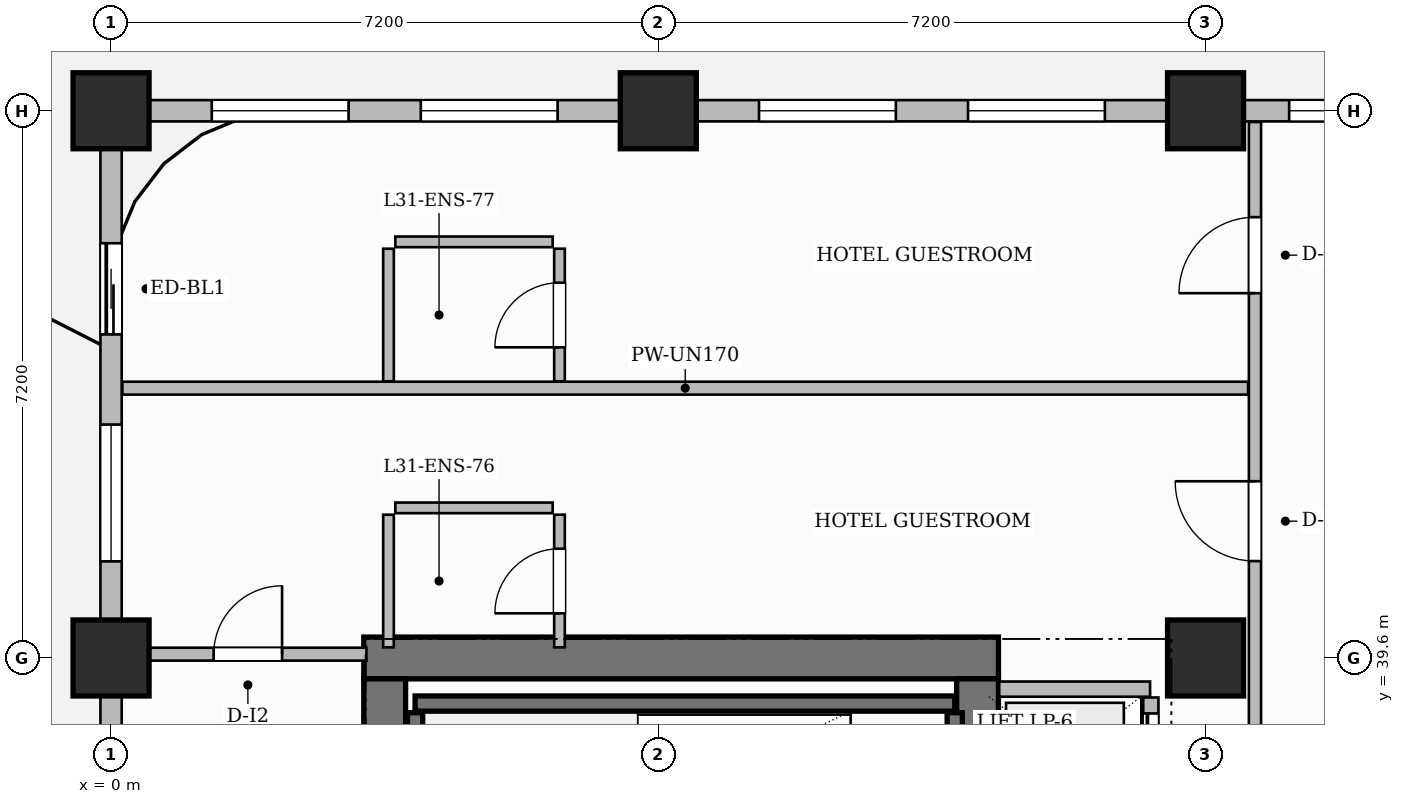
"""IFC4 building model, lengths in metres.
Left out: names, types, materials, properties, quantities, classifications, styles, units other than length and angle.
Written with IfcOpenShell. Run it as: python <this file> out.ifc"""

import sys

from ifc_helpers import new_model, si_unit, direction, frame, frame_2d, origin, origin_2d, place, context, subcontext, project, spatial, rectangle, extrude, source, transform, mapped, element, fill, save


model = new_model("IFC4")
c1 = context("Model", 3, precision=1e-05, world=origin(), true_north=direction((0.0, 1.0)))
c2 = subcontext(c1, "Body", "Model", "MODEL_VIEW")
j1 = project(units=[si_unit("LENGTHUNIT", "METRE"), si_unit("PLANEANGLEUNIT", "RADIAN")], contexts=[c1])
p1 = place(None, origin())
s1 = spatial("IfcSite", under=j1, at=p1, CompositionType="ELEMENT")
p2 = place(p1, origin())
s2 = spatial("IfcBuilding", under=s1, at=p2, CompositionType="ELEMENT")
p3 = place(p2, frame((0.0, 0.0, 126.6)))
s3 = spatial("IfcBuildingStorey", under=s2, at=p3, CompositionType="ELEMENT", Elevation=126.6)
p4 = place(p3, frame((3.325, 39.6, 0.0), z_axis=(0.0, 0.0, 1.0), x_axis=(1.0, 0.0, 0.0)))
e1 = element("IfcWall", 1, at=p4, inside=s3, PredefinedType="SHEAR", context=c2, shape_type="SweptSolid", body=[
    extrude(rectangle(XDim=8.35, YDim=0.55, at=frame_2d((4.175, 0.0))), origin(), (0.0, 0.0, 1.0), 3.7),
])
p5 = place(p3, frame((3.6, 25.475, 0.0), z_axis=(0.0, 0.0, 1.0), x_axis=(0.0, 1.0, 0.0)))
e2 = element("IfcWall", 2, at=p5, inside=s3, PredefinedType="SHEAR", context=c2, shape_type="SweptSolid", body=[
    extrude(rectangle(XDim=13.85, YDim=0.55, at=frame_2d((6.925, 0.0))), origin(), (0.0, 0.0, 1.0), 3.7),
])
p6 = place(p3, frame((11.4, 25.475, 0.0), z_axis=(0.0, 0.0, 1.0), x_axis=(0.0, 1.0, 0.0)))
e3 = element("IfcWall", 3, at=p6, inside=s3, PredefinedType="SHEAR", context=c2, shape_type="SweptSolid", body=[
    extrude(rectangle(XDim=13.85, YDim=0.55, at=frame_2d((6.925, 0.0))), origin(), (0.0, 0.0, 1.0), 3.7),
])
p7 = place(p6, frame((6.495, 0.0, 0.0)))
e4 = element("IfcOpeningElement", 4, at=p7, cuts=e3, PredefinedType="OPENING", context=c2, shape_type="SweptSolid", body=[
    extrude(rectangle(XDim=1.5, YDim=2.2, at=frame_2d((0.75, 1.1))), frame((0.0, 0.285, 0.0), z_axis=(0.0, -1.0, 0.0), x_axis=(1.0, 0.0, 0.0)), (0.0, 0.0, 1.0), 0.57),
])
m1 = source(origin(), c2, "Body", "SweptSolid", [
    extrude(rectangle(XDim=1.0, YDim=1.0, at=origin_2d()), origin(), (0.0, 0.0, 1.0), 3.7),
])
for number, where, z_axis, x_axis in (
    (5, (0.0, 39.6, 0.0), (0.0, 0.0, 1.0), (1.0, 0.0, 0.0)),
    (6, (0.0, 46.8, 0.0), (0.0, 0.0, 1.0), (1.0, 0.0, 0.0)),
    (7, (7.2, 46.8, 0.0), (0.0, 0.0, 1.0), (1.0, 0.0, 0.0)),
    (8, (14.4, 39.6, 0.0), (0.0, 0.0, 1.0), (1.0, 0.0, 0.0)),
    (9, (14.4, 46.8, 0.0), (0.0, 0.0, 1.0), (1.0, 0.0, 0.0)),
):
    element("IfcColumn", number, at=place(p3, frame(where, z_axis=z_axis, x_axis=x_axis)), inside=s3, PredefinedType="COLUMN", context=c2, shape_type="MappedRepresentation", body=[
        mapped(m1, transform((0.0, 0.0, 0.0), scale=1.0)),
    ])
p8 = place(p3, frame((4.0, 39.0, 0.0), z_axis=(0.0, 0.0, 1.0), x_axis=(1.0, 0.0, 0.0)))
e10 = element("IfcWall", 10, at=p8, inside=s3, PredefinedType="SHEAR", context=c2, shape_type="SweptSolid", body=[
    extrude(rectangle(XDim=7.1, YDim=0.2, at=frame_2d((3.55, 0.0))), origin(), (0.0, 0.0, 1.0), 3.7),
])
for number, where, z_axis, x_axis in (
    (11, (4.0, 36.18, 0.0), (0.0, 0.0, 1.0), (0.0, 1.0, 0.0)),
    (12, (11.1, 36.18, 0.0), (0.0, 0.0, 1.0), (0.0, 1.0, 0.0)),
):
    element("IfcWall", number, at=place(p3, frame(where, z_axis=z_axis, x_axis=x_axis)), inside=s3, PredefinedType="SHEAR", context=c2, shape_type="SweptSolid", body=[
        extrude(rectangle(XDim=2.7, YDim=0.2, at=frame_2d((1.35, 0.0))), origin(), (0.0, 0.0, 1.0), 3.7),
    ])
p9 = place(p3, frame((11.685, 39.19, 0.0), z_axis=(0.0, 0.0, 1.0), x_axis=(1.0, 0.0, 0.0)))
e13 = element("IfcWall", 13, at=p9, inside=s3, PredefinedType="PARTITIONING", context=c2, shape_type="SweptSolid", body=[
    extrude(rectangle(XDim=1.985, YDim=0.2, at=frame_2d((0.992, 0.0))), origin(), (0.0, 0.0, 1.0), 3.45),
])
p10 = place(p3, frame((13.68, 34.36, 0.0), z_axis=(0.0, 0.0, 1.0), x_axis=(0.0, 1.0, 0.0)))
e14 = element("IfcWall", 14, at=p10, inside=s3, PredefinedType="PARTITIONING", context=c2, shape_type="SweptSolid", body=[
    extrude(rectangle(XDim=4.72, YDim=0.2, at=frame_2d((2.36, 0.0))), origin(), (0.0, 0.0, 1.0), 3.45),
])
p11 = place(p10, frame((0.21, 0.0, 0.0)))
e15 = element("IfcOpeningElement", 15, at=p11, cuts=e14, PredefinedType="OPENING", context=c2, shape_type="SweptSolid", body=[
    extrude(rectangle(XDim=1.1, YDim=2.2, at=frame_2d((0.55, 1.1))), frame((0.0, 0.11, 0.0), z_axis=(0.0, -1.0, 0.0), x_axis=(1.0, 0.0, 0.0)), (0.0, 0.0, 1.0), 0.22),
])
p12 = place(p10, frame((1.81, 0.0, 0.0)))
e16 = element("IfcOpeningElement", 16, at=p12, cuts=e14, PredefinedType="OPENING", context=c2, shape_type="SweptSolid", body=[
    extrude(rectangle(XDim=1.1, YDim=2.2, at=frame_2d((0.55, 1.1))), frame((0.0, 0.11, 0.0), z_axis=(0.0, -1.0, 0.0), x_axis=(1.0, 0.0, 0.0)), (0.0, 0.0, 1.0), 0.22),
])
p13 = place(p10, frame((3.41, 0.0, 0.0)))
e17 = element("IfcOpeningElement", 17, at=p13, cuts=e14, PredefinedType="OPENING", context=c2, shape_type="SweptSolid", body=[
    extrude(rectangle(XDim=1.1, YDim=2.2, at=frame_2d((0.55, 1.1))), frame((0.0, 0.11, 0.0), z_axis=(0.0, -1.0, 0.0), x_axis=(1.0, 0.0, 0.0)), (0.0, 0.0, 1.0), 0.22),
])
p14 = place(p3, frame((0.24, 39.65, 0.0), z_axis=(0.0, 0.0, 1.0), x_axis=(1.0, 0.0, 0.0)))
e18 = element("IfcWall", 18, at=p14, inside=s3, PredefinedType="PARTITIONING", context=c2, shape_type="SweptSolid", body=[
    extrude(rectangle(XDim=3.12, YDim=0.17, at=frame_2d((1.56, 0.0))), origin(), (0.0, 0.0, 1.0), 3.45),
])
p15 = place(p14, frame((1.11, 0.0, 0.0)))
e19 = element("IfcOpeningElement", 19, at=p15, cuts=e18, PredefinedType="OPENING", context=c2, shape_type="SweptSolid", body=[
    extrude(rectangle(XDim=0.9, YDim=2.15, at=frame_2d((0.45, 1.075))), frame((0.0, 0.095, 0.0), z_axis=(0.0, -1.0, 0.0), x_axis=(1.0, 0.0, 0.0)), (0.0, 0.0, 1.0), 0.19),
])
p16 = place(p3, frame((15.05, 34.34, 0.0), z_axis=(0.0, 0.0, 1.0), x_axis=(0.0, 1.0, 0.0)))
e20 = element("IfcWall", 20, at=p16, inside=s3, PredefinedType="PARTITIONING", context=c2, shape_type="SweptSolid", body=[
    extrude(rectangle(XDim=12.312, YDim=0.16, at=frame_2d((6.156, 0.0))), origin(), (0.0, 0.0, 1.0), 3.45),
])
p17 = place(p16, frame((6.535, 0.0, 0.0)))
e21 = element("IfcOpeningElement", 21, at=p17, cuts=e20, PredefinedType="OPENING", context=c2, shape_type="SweptSolid", body=[
    extrude(rectangle(XDim=1.05, YDim=2.25, at=frame_2d((0.525, 1.125))), frame((0.0, 0.09, 0.0), z_axis=(0.0, -1.0, 0.0), x_axis=(1.0, 0.0, 0.0)), (0.0, 0.0, 1.0), 0.18),
])
p18 = place(p16, frame((10.06, 0.0, 0.0)))
e22 = element("IfcOpeningElement", 22, at=p18, cuts=e20, PredefinedType="OPENING", context=c2, shape_type="SweptSolid", body=[
    extrude(rectangle(XDim=1.0, YDim=2.2, at=frame_2d((0.5, 1.1))), frame((0.0, 0.09, 0.0), z_axis=(0.0, -1.0, 0.0), x_axis=(1.0, 0.0, 0.0)), (0.0, 0.0, 1.0), 0.18),
])
p19 = place(p3, frame((0.148, 43.15, 0.0), z_axis=(0.0, 0.0, 1.0), x_axis=(1.0, 0.0, 0.0)))
e23 = element("IfcWall", 23, at=p19, inside=s3, PredefinedType="PARTITIONING", context=c2, shape_type="SweptSolid", body=[
    extrude(rectangle(XDim=14.812, YDim=0.17, at=frame_2d((7.406, 0.0))), origin(), (0.0, 0.0, 1.0), 3.45),
])
p20 = place(p3, frame((3.65, 39.74, 0.0), z_axis=(0.0, 0.0, 1.0), x_axis=(0.0, 1.0, 0.0)))
e24 = element("IfcWall", 24, at=p20, inside=s3, PredefinedType="PARTITIONING", context=c2, shape_type="SweptSolid", body=[
    extrude(rectangle(XDim=1.745, YDim=0.14, at=frame_2d((0.873, 0.0))), origin(), (0.0, 0.0, 1.0), 3.45),
])
p21 = place(p3, frame((3.74, 41.575, 0.0), z_axis=(0.0, 0.0, 1.0), x_axis=(1.0, 0.0, 0.0)))
e25 = element("IfcWall", 25, at=p21, inside=s3, PredefinedType="PARTITIONING", context=c2, shape_type="SweptSolid", body=[
    extrude(rectangle(XDim=2.07, YDim=0.14, at=frame_2d((1.035, 0.0))), origin(), (0.0, 0.0, 1.0), 2.935),
])
p22 = place(p3, frame((5.9, 39.74, 0.0), z_axis=(0.0, 0.0, 1.0), x_axis=(0.0, 1.0, 0.0)))
e26 = element("IfcWall", 26, at=p22, inside=s3, PredefinedType="PARTITIONING", context=c2, shape_type="SweptSolid", body=[
    extrude(rectangle(XDim=1.745, YDim=0.14, at=frame_2d((0.873, 0.0))), origin(), (0.0, 0.0, 1.0), 3.45),
])
p23 = place(p22, frame((0.448, 0.0, 0.0)))
e27 = element("IfcOpeningElement", 27, at=p23, cuts=e26, PredefinedType="OPENING", context=c2, shape_type="SweptSolid", body=[
    extrude(rectangle(XDim=0.85, YDim=2.1, at=frame_2d((0.425, 1.05))), frame((0.0, 0.08, 0.0), z_axis=(0.0, -1.0, 0.0), x_axis=(1.0, 0.0, 0.0)), (0.0, 0.0, 1.0), 0.16),
])
p24 = place(p3, frame((3.65, 43.24, 0.0), z_axis=(0.0, 0.0, 1.0), x_axis=(0.0, 1.0, 0.0)))
e28 = element("IfcWall", 28, at=p24, inside=s3, PredefinedType="PARTITIONING", context=c2, shape_type="SweptSolid", body=[
    extrude(rectangle(XDim=1.745, YDim=0.14, at=frame_2d((0.873, 0.0))), origin(), (0.0, 0.0, 1.0), 3.45),
])
p25 = place(p3, frame((3.74, 45.075, 0.0), z_axis=(0.0, 0.0, 1.0), x_axis=(1.0, 0.0, 0.0)))
e29 = element("IfcWall", 29, at=p25, inside=s3, PredefinedType="PARTITIONING", context=c2, shape_type="SweptSolid", body=[
    extrude(rectangle(XDim=2.07, YDim=0.14, at=frame_2d((1.035, 0.0))), origin(), (0.0, 0.0, 1.0), 3.45),
])
p26 = place(p3, frame((5.9, 43.24, 0.0), z_axis=(0.0, 0.0, 1.0), x_axis=(0.0, 1.0, 0.0)))
e30 = element("IfcWall", 30, at=p26, inside=s3, PredefinedType="PARTITIONING", context=c2, shape_type="SweptSolid", body=[
    extrude(rectangle(XDim=1.745, YDim=0.14, at=frame_2d((0.873, 0.0))), origin(), (0.0, 0.0, 1.0), 3.45),
])
p27 = place(p26, frame((0.448, 0.0, 0.0)))
e31 = element("IfcOpeningElement", 31, at=p27, cuts=e30, PredefinedType="OPENING", context=c2, shape_type="SweptSolid", body=[
    extrude(rectangle(XDim=0.85, YDim=2.1, at=frame_2d((0.425, 1.05))), frame((0.0, 0.08, 0.0), z_axis=(0.0, -1.0, 0.0), x_axis=(1.0, 0.0, 0.0)), (0.0, 0.0, 1.0), 0.16),
])
p28 = place(p3, frame((0.0, 25.25, 0.0), z_axis=(0.0, 0.0, 1.0), x_axis=(0.0, 1.0, 0.0)))
e32 = element("IfcWall", 32, at=p28, inside=s3, PredefinedType="SOLIDWALL", context=c2, shape_type="SweptSolid", body=[
    extrude(rectangle(XDim=21.5, YDim=0.28, at=frame_2d((10.75, 0.0))), origin(), (0.0, 0.0, 1.0), 2.935),
])
p29 = place(p28, frame((18.607, 0.0, 0.0)))
e33 = element("IfcOpeningElement", 33, at=p29, cuts=e32, PredefinedType="OPENING", context=c2, shape_type="SweptSolid", body=[
    extrude(rectangle(XDim=1.2, YDim=2.2, at=frame_2d((0.6, 1.1))), frame((0.0, 0.15, 0.0), z_axis=(0.0, -1.0, 0.0), x_axis=(1.0, 0.0, 0.0)), (0.0, 0.0, 1.0), 0.3),
])
p30 = place(p28, frame((0.8, 0.0, 0.0)))
e34 = element("IfcOpeningElement", 34, at=p30, cuts=e32, PredefinedType="OPENING", context=c2, shape_type="SweptSolid", body=[
    extrude(rectangle(XDim=1.2, YDim=2.2, at=frame_2d((0.6, 1.1))), frame((0.0, 0.15, 0.0), z_axis=(0.0, -1.0, 0.0), x_axis=(1.0, 0.0, 0.0)), (0.0, 0.0, 1.0), 0.3),
])
p31 = place(p28, frame((3.425, 0.0, 0.8)))
e35 = element("IfcOpeningElement", 35, at=p31, cuts=e32, PredefinedType="OPENING", context=c2, shape_type="SweptSolid", body=[
    extrude(rectangle(XDim=1.8, YDim=1.85, at=frame_2d((0.9, 0.925))), frame((0.0, 0.15, 0.0), z_axis=(0.0, -1.0, 0.0), x_axis=(1.0, 0.0, 0.0)), (0.0, 0.0, 1.0), 0.3),
])
p32 = place(p28, frame((8.475, 0.0, 0.8)))
e36 = element("IfcOpeningElement", 36, at=p32, cuts=e32, PredefinedType="OPENING", context=c2, shape_type="SweptSolid", body=[
    extrude(rectangle(XDim=1.8, YDim=1.85, at=frame_2d((0.9, 0.925))), frame((0.0, 0.15, 0.0), z_axis=(0.0, -1.0, 0.0), x_axis=(1.0, 0.0, 0.0)), (0.0, 0.0, 1.0), 0.3),
])
p33 = place(p28, frame((11.225, 0.0, 0.8)))
e37 = element("IfcOpeningElement", 37, at=p33, cuts=e32, PredefinedType="OPENING", context=c2, shape_type="SweptSolid", body=[
    extrude(rectangle(XDim=1.8, YDim=1.85, at=frame_2d((0.9, 0.925))), frame((0.0, 0.15, 0.0), z_axis=(0.0, -1.0, 0.0), x_axis=(1.0, 0.0, 0.0)), (0.0, 0.0, 1.0), 0.3),
])
p34 = place(p28, frame((15.621, 0.0, 0.8)))
e38 = element("IfcOpeningElement", 38, at=p34, cuts=e32, PredefinedType="OPENING", context=c2, shape_type="SweptSolid", body=[
    extrude(rectangle(XDim=1.8, YDim=1.85, at=frame_2d((0.9, 0.925))), frame((0.0, 0.15, 0.0), z_axis=(0.0, -1.0, 0.0), x_axis=(1.0, 0.0, 0.0)), (0.0, 0.0, 1.0), 0.3),
])
p35 = place(p3, frame((0.0, 46.8, 0.0), z_axis=(0.0, 0.0, 1.0), x_axis=(1.0, 0.0, 0.0)))
e39 = element("IfcWall", 39, at=p35, inside=s3, PredefinedType="SOLIDWALL", context=c2, shape_type="SweptSolid", body=[
    extrude(rectangle(XDim=18.0, YDim=0.28, at=frame_2d((9.0, 0.0))), origin(), (0.0, 0.0, 1.0), 2.935),
])
p36 = place(p35, frame((1.325, 0.0, 0.8)))
e40 = element("IfcOpeningElement", 40, at=p36, cuts=e39, PredefinedType="OPENING", context=c2, shape_type="SweptSolid", body=[
    extrude(rectangle(XDim=1.8, YDim=1.85, at=frame_2d((0.9, 0.925))), frame((0.0, 0.15, 0.0), z_axis=(0.0, -1.0, 0.0), x_axis=(1.0, 0.0, 0.0)), (0.0, 0.0, 1.0), 0.3),
])
p37 = place(p35, frame((4.075, 0.0, 0.8)))
e41 = element("IfcOpeningElement", 41, at=p37, cuts=e39, PredefinedType="OPENING", context=c2, shape_type="SweptSolid", body=[
    extrude(rectangle(XDim=1.8, YDim=1.85, at=frame_2d((0.9, 0.925))), frame((0.0, 0.15, 0.0), z_axis=(0.0, -1.0, 0.0), x_axis=(1.0, 0.0, 0.0)), (0.0, 0.0, 1.0), 0.3),
])
p38 = place(p35, frame((8.525, 0.0, 0.8)))
e42 = element("IfcOpeningElement", 42, at=p38, cuts=e39, PredefinedType="OPENING", context=c2, shape_type="SweptSolid", body=[
    extrude(rectangle(XDim=1.8, YDim=1.85, at=frame_2d((0.9, 0.925))), frame((0.0, 0.15, 0.0), z_axis=(0.0, -1.0, 0.0), x_axis=(1.0, 0.0, 0.0)), (0.0, 0.0, 1.0), 0.3),
])
p39 = place(p35, frame((11.275, 0.0, 0.8)))
e43 = element("IfcOpeningElement", 43, at=p39, cuts=e39, PredefinedType="OPENING", context=c2, shape_type="SweptSolid", body=[
    extrude(rectangle(XDim=1.8, YDim=1.85, at=frame_2d((0.9, 0.925))), frame((0.0, 0.15, 0.0), z_axis=(0.0, -1.0, 0.0), x_axis=(1.0, 0.0, 0.0)), (0.0, 0.0, 1.0), 0.3),
])
p40 = place(p35, frame((15.5, 0.0, 0.8)))
e44 = element("IfcOpeningElement", 44, at=p40, cuts=e39, PredefinedType="OPENING", context=c2, shape_type="SweptSolid", body=[
    extrude(rectangle(XDim=1.4, YDim=1.85, at=frame_2d((0.7, 0.925))), frame((0.0, 0.15, 0.0), z_axis=(0.0, -1.0, 0.0), x_axis=(1.0, 0.0, 0.0)), (0.0, 0.0, 1.0), 0.3),
])
m2 = source(origin(), c2, "Body", "SweptSolid", [
    extrude(rectangle(XDim=0.9, YDim=2.15, at=frame_2d((0.45, 1.075))), frame((0.0, 0.025, 0.0), z_axis=(0.0, -1.0, 0.0), x_axis=(1.0, 0.0, 0.0)), (0.0, 0.0, 1.0), 0.05),
])
p41 = place(p15, origin())
e45 = element("IfcDoor", 45, at=p41, inside=s3, OperationType="SINGLE_SWING_RIGHT", PredefinedType="DOOR", context=c2, shape_type="MappedRepresentation", body=[
    mapped(m2, transform((0.0, 0.0, 0.0), scale=1.0)),
])
fill(e19, e45)
m3 = source(origin(), c2, "Body", "SweptSolid", [
    extrude(rectangle(XDim=0.85, YDim=2.1, at=frame_2d((0.425, 1.05))), frame((0.0, 0.025, 0.0), z_axis=(0.0, -1.0, 0.0), x_axis=(1.0, 0.0, 0.0)), (0.0, 0.0, 1.0), 0.05),
])
p42 = place(p23, origin())
e46 = element("IfcDoor", 46, at=p42, inside=s3, OperationType="SINGLE_SWING_LEFT", PredefinedType="DOOR", context=c2, shape_type="MappedRepresentation", body=[
    mapped(m3, transform((0.0, 0.0, 0.0), scale=1.0)),
])
fill(e27, e46)
m4 = source(origin(), c2, "Body", "SweptSolid", [
    extrude(rectangle(XDim=1.05, YDim=2.25, at=frame_2d((0.525, 1.125))), frame((0.0, 0.025, 0.0), z_axis=(0.0, -1.0, 0.0), x_axis=(1.0, 0.0, 0.0)), (0.0, 0.0, 1.0), 0.05),
])
p43 = place(p17, origin())
e47 = element("IfcDoor", 47, at=p43, inside=s3, OperationType="SINGLE_SWING_RIGHT", PredefinedType="DOOR", context=c2, shape_type="MappedRepresentation", body=[
    mapped(m4, transform((0.0, 0.0, 0.0), scale=1.0)),
])
fill(e21, e47)
p44 = place(p27, origin())
e48 = element("IfcDoor", 48, at=p44, inside=s3, OperationType="SINGLE_SWING_LEFT", PredefinedType="DOOR", context=c2, shape_type="MappedRepresentation", body=[
    mapped(m3, transform((0.0, 0.0, 0.0), scale=1.0)),
])
fill(e31, e48)
m5 = source(origin(), c2, "Body", "SweptSolid", [
    extrude(rectangle(XDim=1.0, YDim=2.2, at=frame_2d((0.5, 1.1))), frame((0.0, 0.025, 0.0), z_axis=(0.0, -1.0, 0.0), x_axis=(1.0, 0.0, 0.0)), (0.0, 0.0, 1.0), 0.05),
])
p45 = place(p18, origin())
e49 = element("IfcDoor", 49, at=p45, inside=s3, OperationType="SINGLE_SWING_LEFT", PredefinedType="DOOR", context=c2, shape_type="MappedRepresentation", body=[
    mapped(m5, transform((0.0, 0.0, 0.0), scale=1.0)),
])
fill(e22, e49)
m6 = source(origin(), c2, "Body", "SweptSolid", [
    extrude(rectangle(XDim=1.1, YDim=2.2, at=frame_2d((0.55, 1.1))), frame((0.0, 0.025, 0.0), z_axis=(0.0, -1.0, 0.0), x_axis=(1.0, 0.0, 0.0)), (0.0, 0.0, 1.0), 0.05),
])
p46 = place(p13, origin())
e50 = element("IfcDoor", 50, at=p46, inside=s3, OperationType="SLIDING_TO_LEFT", PredefinedType="DOOR", context=c2, shape_type="MappedRepresentation", body=[
    mapped(m6, transform((0.0, 0.0, 0.0), scale=1.0)),
])
fill(e17, e50)
m7 = source(origin(), c2, "Body", "SweptSolid", [
    extrude(rectangle(XDim=1.2, YDim=2.2, at=frame_2d((0.6, 1.1))), frame((0.0, 0.025, 0.0), z_axis=(0.0, -1.0, 0.0), x_axis=(1.0, 0.0, 0.0)), (0.0, 0.0, 1.0), 0.05),
])
p47 = place(p29, origin())
e51 = element("IfcDoor", 51, at=p47, inside=s3, OperationType="SLIDING_TO_LEFT", PredefinedType="DOOR", context=c2, shape_type="MappedRepresentation", body=[
    mapped(m7, transform((0.0, 0.0, 0.0), scale=1.0)),
])
fill(e33, e51)
m8 = source(origin(), c2, "Body", "SweptSolid", [
    extrude(rectangle(XDim=1.8, YDim=1.85, at=frame_2d((0.9, 0.925))), frame((0.0, 0.03, 0.0), z_axis=(0.0, -1.0, 0.0), x_axis=(1.0, 0.0, 0.0)), (0.0, 0.0, 1.0), 0.06),
])
p48 = place(p34, origin())
e52 = element("IfcWindow", 52, at=p48, inside=s3, PartitioningType="DOUBLE_PANEL_VERTICAL", PredefinedType="WINDOW", context=c2, shape_type="MappedRepresentation", body=[
    mapped(m8, transform((0.0, 0.0, 0.0), scale=1.0)),
])
fill(e38, e52)
p49 = place(p36, origin())
e53 = element("IfcWindow", 53, at=p49, inside=s3, PartitioningType="DOUBLE_PANEL_VERTICAL", PredefinedType="WINDOW", context=c2, shape_type="MappedRepresentation", body=[
    mapped(m8, transform((0.0, 0.0, 0.0), scale=1.0)),
])
fill(e40, e53)
p50 = place(p37, origin())
e54 = element("IfcWindow", 54, at=p50, inside=s3, PartitioningType="DOUBLE_PANEL_VERTICAL", PredefinedType="WINDOW", context=c2, shape_type="MappedRepresentation", body=[
    mapped(m8, transform((0.0, 0.0, 0.0), scale=1.0)),
])
fill(e41, e54)
p51 = place(p38, origin())
e55 = element("IfcWindow", 55, at=p51, inside=s3, PartitioningType="DOUBLE_PANEL_VERTICAL", PredefinedType="WINDOW", context=c2, shape_type="MappedRepresentation", body=[
    mapped(m8, transform((0.0, 0.0, 0.0), scale=1.0)),
])
fill(e42, e55)
p52 = place(p39, origin())
e56 = element("IfcWindow", 56, at=p52, inside=s3, PartitioningType="DOUBLE_PANEL_VERTICAL", PredefinedType="WINDOW", context=c2, shape_type="MappedRepresentation", body=[
    mapped(m8, transform((0.0, 0.0, 0.0), scale=1.0)),
])
fill(e43, e56)
m9 = source(origin(), c2, "Body", "SweptSolid", [
    extrude(rectangle(XDim=1.4, YDim=1.85, at=frame_2d((0.7, 0.925))), frame((0.0, 0.03, 0.0), z_axis=(0.0, -1.0, 0.0), x_axis=(1.0, 0.0, 0.0)), (0.0, 0.0, 1.0), 0.06),
])
p53 = place(p40, origin())
e57 = element("IfcWindow", 57, at=p53, inside=s3, PartitioningType="SINGLE_PANEL", PredefinedType="WINDOW", context=c2, shape_type="MappedRepresentation", body=[
    mapped(m9, transform((0.0, 0.0, 0.0), scale=1.0)),
])
fill(e44, e57)
save(model, sys.argv[1])
